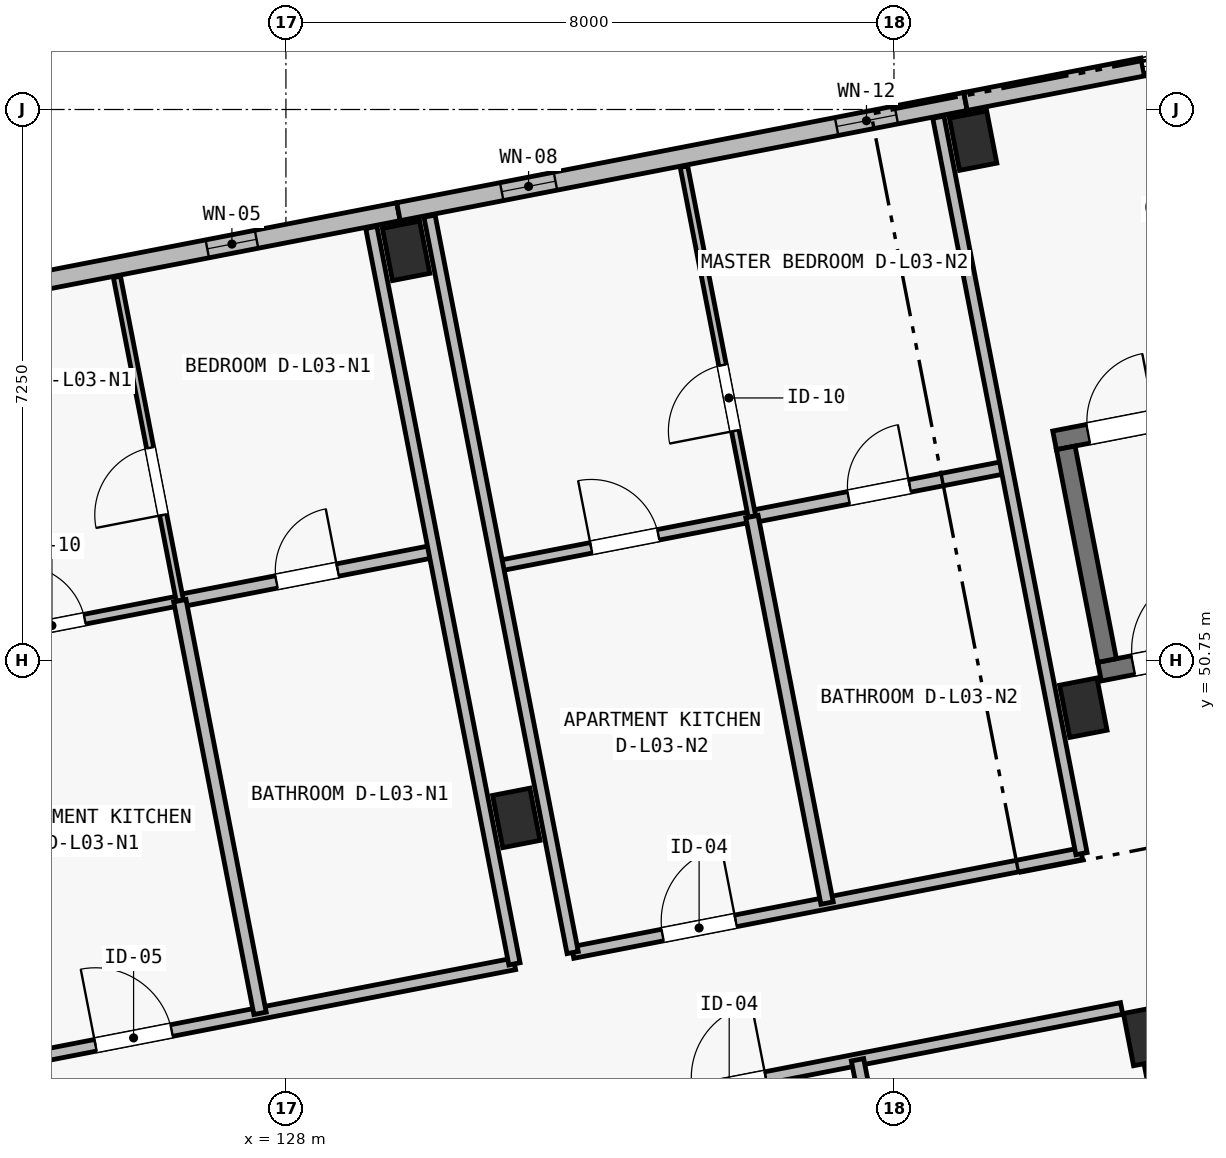
"""IFC4 building model, lengths in metres.
Left out: names, types, materials, properties, quantities, classifications, styles, units other than length and angle.
Written with IfcOpenShell. Run it as: python <this file> out.ifc"""

import sys

from ifc_helpers import new_model, si_unit, direction, frame, frame_2d, origin, origin_2d, place, context, subcontext, project, spatial, rectangle, extrude, element, fill, save


model = new_model("IFC4")
c1 = context("Model", 3, precision=1e-05, world=origin(), true_north=direction((0.0, 1.0)))
c2 = subcontext(c1, "Body", "Model", "MODEL_VIEW")
j1 = project(units=[si_unit("LENGTHUNIT", "METRE"), si_unit("PLANEANGLEUNIT", "RADIAN")], contexts=[c1])
p1 = place(None, origin())
s1 = spatial("IfcSite", under=j1, at=p1, CompositionType="ELEMENT")
p2 = place(p1, origin())
s2 = spatial("IfcBuilding", under=s1, at=p2, CompositionType="ELEMENT")
p3 = place(p2, frame((0.0, 0.0, 11.65)))
s3 = spatial("IfcBuildingStorey", under=s2, at=p3, CompositionType="ELEMENT", Elevation=11.65)
for number, where, z_axis, x_axis in (
    (1, (131.031, 48.68, 0.0), (0.0, 0.0, 1.0), (0.982, 0.191, 0.0)),
    (2, (129.581, 56.14, 0.0), (0.0, 0.0, 1.0), (0.982, 0.191, 0.0)),
    (3, (139.331, 45.811, 0.0), (0.0, 0.0, 1.0), (0.982, 0.191, 0.0)),
    (4, (138.491, 50.13, 0.0), (0.0, 0.0, 1.0), (0.982, 0.191, 0.0)),
    (5, (137.041, 57.59, 0.0), (0.0, 0.0, 1.0), (0.982, 0.191, 0.0)),
):
    element("IfcColumn", number, at=place(p3, frame(where, z_axis=z_axis, x_axis=x_axis)), inside=s3, PredefinedType="COLUMN", context=c2, shape_type="SweptSolid", body=[
        extrude(rectangle(XDim=0.5, YDim=0.7, at=origin_2d()), origin(), (0.0, 0.0, 1.0), 3.25),
    ])
p4 = place(p3, frame((140.714, 38.694, 0.0), z_axis=(0.0, 0.0, 1.0), x_axis=(-0.190819465253, 0.981625148252, 0.0)))
e6 = element("IfcWall", 6, at=p4, inside=s3, PredefinedType="SHEAR", context=c2, shape_type="SweptSolid", body=[
    extrude(rectangle(XDim=6.9, YDim=0.22, at=frame_2d((3.45, 0.0))), origin(), (0.0, 0.0, 1.0), 2.5),
])
p5 = place(p3, frame((138.113, 53.647, 0.0), z_axis=(0.0, 0.0, 1.0), x_axis=(0.981626097708, 0.19081458094, 0.0)))
e7 = element("IfcWall", 7, at=p5, inside=s3, PredefinedType="SHEAR", context=c2, shape_type="SweptSolid", body=[
    extrude(rectangle(XDim=7.0, YDim=0.25, at=frame_2d((3.5, 0.0))), origin(), (0.0, 0.0, 1.0), 3.25),
])
p6 = place(p5, frame((0.45, 0.0, 0.0)))
e8 = element("IfcOpeningElement", 8, at=p6, cuts=e7, PredefinedType="OPENING", context=c2, shape_type="SweptSolid", body=[
    extrude(rectangle(XDim=0.9, YDim=2.1, at=frame_2d((0.45, 1.05))), frame((0.0, 0.14, 0.0), z_axis=(0.0, -1.0, 0.0), x_axis=(1.0, 0.0, 0.0)), (0.0, 0.0, 1.0), 0.28),
])
p7 = place(p3, frame((138.705, 50.604, 0.0), z_axis=(0.0, 0.0, 1.0), x_axis=(0.981626097708, 0.19081458094, 0.0)))
e9 = element("IfcWall", 9, at=p7, inside=s3, PredefinedType="SHEAR", context=c2, shape_type="SweptSolid", body=[
    extrude(rectangle(XDim=7.0, YDim=0.25, at=frame_2d((3.5, 0.0))), origin(), (0.0, 0.0, 1.0), 3.25),
])
p8 = place(p7, frame((0.45, 0.0, 0.0)))
e10 = element("IfcOpeningElement", 10, at=p8, cuts=e9, PredefinedType="OPENING", context=c2, shape_type="SweptSolid", body=[
    extrude(rectangle(XDim=1.05, YDim=2.15, at=frame_2d((0.525, 1.075))), frame((0.0, 0.14, 0.0), z_axis=(0.0, -1.0, 0.0), x_axis=(1.0, 0.0, 0.0)), (0.0, 0.0, 1.0), 0.28),
])
p9 = place(p3, frame((138.804, 50.751, 0.0), z_axis=(0.0, 0.0, 1.0), x_axis=(-0.190858194834, 0.981617618762, 0.0)))
e11 = element("IfcWall", 11, at=p9, inside=s3, PredefinedType="SHEAR", context=c2, shape_type="SweptSolid", body=[
    extrude(rectangle(XDim=2.85, YDim=0.25, at=frame_2d((1.425, 0.0))), origin(), (0.0, 0.0, 1.0), 3.25),
])
p10 = place(p3, frame((122.02, 55.205, 0.0), z_axis=(0.0, 0.0, 1.0), x_axis=(0.981626422232, 0.190812911449, 0.0)))
e12 = element("IfcWall", 12, at=p10, inside=s3, PredefinedType="SOLIDWALL", context=c2, shape_type="SweptSolid", body=[
    extrude(rectangle(XDim=7.6, YDim=0.24, at=frame_2d((3.8, 0.0))), origin(), (0.0, 0.0, 1.0), 3.0),
])
p11 = place(p10, frame((1.932, 0.0, 0.44)))
e13 = element("IfcOpeningElement", 13, at=p11, cuts=e12, PredefinedType="OPENING", context=c2, shape_type="SweptSolid", body=[
    extrude(rectangle(XDim=0.58, YDim=2.16, at=frame_2d((0.29, 1.08))), frame((0.0, 0.135, 0.0), z_axis=(0.0, -1.0, 0.0), x_axis=(1.0, 0.0, 0.0)), (0.0, 0.0, 1.0), 0.27),
])
p12 = place(p10, frame((5.038, 0.0, 0.5)))
e14 = element("IfcOpeningElement", 14, at=p12, cuts=e12, PredefinedType="OPENING", context=c2, shape_type="SweptSolid", body=[
    extrude(rectangle(XDim=0.66, YDim=2.32, at=frame_2d((0.33, 1.16))), frame((0.0, 0.135, 0.0), z_axis=(0.0, -1.0, 0.0), x_axis=(1.0, 0.0, 0.0)), (0.0, 0.0, 1.0), 0.27),
])
p13 = place(p3, frame((129.481, 56.656, 0.0), z_axis=(0.0, 0.0, 1.0), x_axis=(0.981626422232, 0.190812911449, 0.0)))
e15 = element("IfcWall", 15, at=p13, inside=s3, PredefinedType="SOLIDWALL", context=c2, shape_type="SweptSolid", body=[
    extrude(rectangle(XDim=7.6, YDim=0.24, at=frame_2d((3.8, 0.0))), origin(), (0.0, 0.0, 1.0), 3.0),
])
p14 = place(p13, frame((1.384, 0.0, 0.5)))
e16 = element("IfcOpeningElement", 16, at=p14, cuts=e15, PredefinedType="OPENING", context=c2, shape_type="SweptSolid", body=[
    extrude(rectangle(XDim=0.72, YDim=2.16, at=frame_2d((0.36, 1.08))), frame((0.0, 0.135, 0.0), z_axis=(0.0, -1.0, 0.0), x_axis=(1.0, 0.0, 0.0)), (0.0, 0.0, 1.0), 0.27),
])
p15 = place(p13, frame((5.873, 0.0, 0.44)))
e17 = element("IfcOpeningElement", 17, at=p15, cuts=e15, PredefinedType="OPENING", context=c2, shape_type="SweptSolid", body=[
    extrude(rectangle(XDim=0.8, YDim=2.3, at=frame_2d((0.4, 1.15))), frame((0.0, 0.135, 0.0), z_axis=(0.0, -1.0, 0.0), x_axis=(1.0, 0.0, 0.0)), (0.0, 0.0, 1.0), 0.27),
])
p16 = place(p3, frame((136.941, 58.106, 0.0), z_axis=(0.0, 0.0, 1.0), x_axis=(0.981629832251, 0.190795367961, 0.0)))
e18 = element("IfcWall", 18, at=p16, inside=s3, PredefinedType="SOLIDWALL", context=c2, shape_type="SweptSolid", body=[
    extrude(rectangle(XDim=2.375, YDim=0.24, at=frame_2d((1.188, 0.0))), origin(), (0.0, 0.0, 1.0), 3.0),
])
p17 = place(p3, frame((132.046, 44.823, 0.0), z_axis=(0.0, 0.0, 1.0), x_axis=(0.9816234647, 0.190828125677, 0.0)))
e19 = element("IfcWall", 19, at=p17, inside=s3, PredefinedType="PARTITIONING", context=c2, shape_type="SweptSolid", body=[
    extrude(rectangle(XDim=7.08, YDim=0.155, at=frame_2d((3.54, 0.0))), origin(), (0.0, 0.0, 1.0), 2.97),
])
p18 = place(p17, frame((1.33, 0.0, 0.0)))
e20 = element("IfcOpeningElement", 20, at=p18, cuts=e19, PredefinedType="OPENING", context=c2, shape_type="SweptSolid", body=[
    extrude(rectangle(XDim=0.98, YDim=2.15, at=frame_2d((0.49, 1.075))), frame((0.0, 0.093, 0.0), z_axis=(0.0, -1.0, 0.0), x_axis=(1.0, 0.0, 0.0)), (0.0, 0.0, 1.0), 0.185),
])
p19 = place(p3, frame((136.297, 41.503, 0.0), z_axis=(0.0, 0.0, 1.0), x_axis=(-0.190807044121, 0.981627562731, 0.0)))
e21 = element("IfcWall", 21, at=p19, inside=s3, PredefinedType="PLUMBINGWALL", context=c2, shape_type="SweptSolid", body=[
    extrude(rectangle(XDim=4.07, YDim=0.165, at=frame_2d((2.035, 0.0))), origin(), (0.0, 0.0, 1.0), 2.97),
])
p20 = place(p3, frame((124.312, 45.459, 0.0), z_axis=(0.0, 0.0, 1.0), x_axis=(0.981627870431, 0.190805461121, 0.0)))
e22 = element("IfcWall", 22, at=p20, inside=s3, PredefinedType="PARTITIONING", context=c2, shape_type="SweptSolid", body=[
    extrude(rectangle(XDim=6.82, YDim=0.155, at=frame_2d((3.41, 0.0))), origin(), (0.0, 0.0, 1.0), 2.97),
])
p21 = place(p20, frame((1.205, 0.0, 0.0)))
e23 = element("IfcOpeningElement", 23, at=p21, cuts=e22, PredefinedType="OPENING", context=c2, shape_type="SweptSolid", body=[
    extrude(rectangle(XDim=1.02, YDim=2.2, at=frame_2d((0.51, 1.1))), frame((0.0, 0.093, 0.0), z_axis=(0.0, -1.0, 0.0), x_axis=(1.0, 0.0, 0.0)), (0.0, 0.0, 1.0), 0.185),
])
p22 = place(p3, frame((123.257, 50.887, 0.0), z_axis=(0.0, 0.0, 1.0), x_axis=(0.981629173664, 0.190798756314, 0.0)))
e24 = element("IfcWall", 24, at=p22, inside=s3, PredefinedType="PARTITIONING", context=c2, shape_type="SweptSolid", body=[
    extrude(rectangle(XDim=3.41, YDim=0.13, at=frame_2d((1.705, 0.0))), origin(), (0.0, 0.0, 1.0), 2.97),
])
p23 = place(p22, frame((1.255, 0.0, 0.0)))
e25 = element("IfcOpeningElement", 25, at=p23, cuts=e24, PredefinedType="OPENING", context=c2, shape_type="SweptSolid", body=[
    extrude(rectangle(XDim=0.88, YDim=2.1, at=frame_2d((0.44, 1.05))), frame((0.0, 0.08, 0.0), z_axis=(0.0, -1.0, 0.0), x_axis=(1.0, 0.0, 0.0)), (0.0, 0.0, 1.0), 0.16),
])
p24 = place(p3, frame((126.604, 51.538, 0.0), z_axis=(0.0, 0.0, 1.0), x_axis=(0.98162656706, 0.190812166391, 0.0)))
e26 = element("IfcWall", 26, at=p24, inside=s3, PredefinedType="PLUMBINGWALL", context=c2, shape_type="SweptSolid", body=[
    extrude(rectangle(XDim=3.41, YDim=0.165, at=frame_2d((1.705, 0.0))), origin(), (0.0, 0.0, 1.0), 2.97),
])
p25 = place(p24, frame((1.295, 0.0, 0.0)))
e27 = element("IfcOpeningElement", 27, at=p25, cuts=e26, PredefinedType="OPENING", context=c2, shape_type="SweptSolid", body=[
    extrude(rectangle(XDim=0.82, YDim=2.08, at=frame_2d((0.41, 1.04))), frame((0.0, 0.097, 0.0), z_axis=(0.0, -1.0, 0.0), x_axis=(1.0, 0.0, 0.0)), (0.0, 0.0, 1.0), 0.195),
])
p26 = place(p3, frame((126.604, 51.538, 0.0), z_axis=(0.0, 0.0, 1.0), x_axis=(-0.190812443151, 0.981626513262, 0.0)))
e28 = element("IfcWall", 28, at=p26, inside=s3, PredefinedType="PARTITIONING", context=c2, shape_type="SweptSolid", body=[
    extrude(rectangle(XDim=4.34, YDim=0.095, at=frame_2d((2.17, 0.0))), origin(), (0.0, 0.0, 1.0), 2.97),
])
p27 = place(p26, frame((1.15, 0.0, 0.0)))
e29 = element("IfcOpeningElement", 29, at=p27, cuts=e28, PredefinedType="OPENING", context=c2, shape_type="SweptSolid", body=[
    extrude(rectangle(XDim=0.9, YDim=2.1, at=frame_2d((0.45, 1.05))), frame((0.0, 0.062, 0.0), z_axis=(0.0, -1.0, 0.0), x_axis=(1.0, 0.0, 0.0)), (0.0, 0.0, 1.0), 0.125),
])
p28 = place(p3, frame((127.66, 46.109, 0.0), z_axis=(0.0, 0.0, 1.0), x_axis=(-0.190815300433, 0.981625957848, 0.0)))
e30 = element("IfcWall", 30, at=p28, inside=s3, PredefinedType="PLUMBINGWALL", context=c2, shape_type="SweptSolid", body=[
    extrude(rectangle(XDim=5.53, YDim=0.165, at=frame_2d((2.765, 0.0))), origin(), (0.0, 0.0, 1.0), 2.97),
])
p29 = place(p3, frame((131.007, 46.76, 0.0), z_axis=(0.0, 0.0, 1.0), x_axis=(-0.190809410863, 0.981627102685, 0.0)))
e31 = element("IfcWall", 31, at=p29, inside=s3, PredefinedType="PARTITIONING", context=c2, shape_type="SweptSolid", body=[
    extrude(rectangle(XDim=9.87, YDim=0.15, at=frame_2d((4.935, 0.0))), origin(), (0.0, 0.0, 1.0), 2.97),
])
p30 = place(p3, frame((131.772, 46.909, 0.0), z_axis=(0.0, 0.0, 1.0), x_axis=(0.981622468528, 0.190833249935, 0.0)))
e32 = element("IfcWall", 32, at=p30, inside=s3, PredefinedType="PARTITIONING", context=c2, shape_type="SweptSolid", body=[
    extrude(rectangle(XDim=6.82, YDim=0.155, at=frame_2d((3.41, 0.0))), origin(), (0.0, 0.0, 1.0), 2.97),
])
p31 = place(p30, frame((1.205, 0.0, 0.0)))
e33 = element("IfcOpeningElement", 33, at=p31, cuts=e32, PredefinedType="OPENING", context=c2, shape_type="SweptSolid", body=[
    extrude(rectangle(XDim=0.98, YDim=2.15, at=frame_2d((0.49, 1.075))), frame((0.0, 0.093, 0.0), z_axis=(0.0, -1.0, 0.0), x_axis=(1.0, 0.0, 0.0)), (0.0, 0.0, 1.0), 0.185),
])
p32 = place(p3, frame((130.784, 51.994, 0.0), z_axis=(0.0, 0.0, 1.0), x_axis=(0.981629173664, 0.190798756314, 0.0)))
e34 = element("IfcWall", 34, at=p32, inside=s3, PredefinedType="PARTITIONING", context=c2, shape_type="SweptSolid", body=[
    extrude(rectangle(XDim=3.41, YDim=0.14, at=frame_2d((1.705, 0.0))), origin(), (0.0, 0.0, 1.0), 2.97),
])
p33 = place(p32, frame((1.255, 0.0, 0.0)))
e35 = element("IfcOpeningElement", 35, at=p33, cuts=e34, PredefinedType="OPENING", context=c2, shape_type="SweptSolid", body=[
    extrude(rectangle(XDim=0.9, YDim=2.1, at=frame_2d((0.45, 1.05))), frame((0.0, 0.085, 0.0), z_axis=(0.0, -1.0, 0.0), x_axis=(1.0, 0.0, 0.0)), (0.0, 0.0, 1.0), 0.17),
])
p34 = place(p3, frame((134.132, 52.644, 0.0), z_axis=(0.0, 0.0, 1.0), x_axis=(0.981629173664, 0.190798756314, 0.0)))
e36 = element("IfcWall", 36, at=p34, inside=s3, PredefinedType="PLUMBINGWALL", context=c2, shape_type="SweptSolid", body=[
    extrude(rectangle(XDim=3.41, YDim=0.165, at=frame_2d((1.705, 0.0))), origin(), (0.0, 0.0, 1.0), 2.97),
])
p35 = place(p34, frame((1.295, 0.0, 0.0)))
e37 = element("IfcOpeningElement", 37, at=p35, cuts=e36, PredefinedType="OPENING", context=c2, shape_type="SweptSolid", body=[
    extrude(rectangle(XDim=0.82, YDim=2.08, at=frame_2d((0.41, 1.04))), frame((0.0, 0.097, 0.0), z_axis=(0.0, -1.0, 0.0), x_axis=(1.0, 0.0, 0.0)), (0.0, 0.0, 1.0), 0.195),
])
p36 = place(p3, frame((134.132, 52.644, 0.0), z_axis=(0.0, 0.0, 1.0), x_axis=(-0.190837612577, 0.981621620394, 0.0)))
e38 = element("IfcWall", 38, at=p36, inside=s3, PredefinedType="PARTITIONING", context=c2, shape_type="SweptSolid", body=[
    extrude(rectangle(XDim=4.69, YDim=0.1, at=frame_2d((2.345, 0.0))), origin(), (0.0, 0.0, 1.0), 2.97),
])
p37 = place(p36, frame((1.15, 0.0, 0.0)))
e39 = element("IfcOpeningElement", 39, at=p37, cuts=e38, PredefinedType="OPENING", context=c2, shape_type="SweptSolid", body=[
    extrude(rectangle(XDim=0.88, YDim=2.1, at=frame_2d((0.44, 1.05))), frame((0.0, 0.065, 0.0), z_axis=(0.0, -1.0, 0.0), x_axis=(1.0, 0.0, 0.0)), (0.0, 0.0, 1.0), 0.13),
])
p38 = place(p3, frame((135.12, 47.559, 0.0), z_axis=(0.0, 0.0, 1.0), x_axis=(-0.190783877533, 0.981632065528, 0.0)))
e40 = element("IfcWall", 40, at=p38, inside=s3, PredefinedType="PLUMBINGWALL", context=c2, shape_type="SweptSolid", body=[
    extrude(rectangle(XDim=5.18, YDim=0.165, at=frame_2d((2.59, 0.0))), origin(), (0.0, 0.0, 1.0), 2.97),
])
p39 = place(p3, frame((131.772, 46.909, 0.0), z_axis=(0.0, 0.0, 1.0), x_axis=(-0.1907855758, 0.981631735462, 0.0)))
e41 = element("IfcWall", 41, at=p39, inside=s3, PredefinedType="PARTITIONING", context=c2, shape_type="SweptSolid", body=[
    extrude(rectangle(XDim=9.87, YDim=0.15, at=frame_2d((4.935, 0.0))), origin(), (0.0, 0.0, 1.0), 2.97),
])
p40 = place(p3, frame((138.467, 48.21, 0.0), z_axis=(0.0, 0.0, 1.0), x_axis=(-0.190814044018, 0.981626202078, 0.0)))
e42 = element("IfcWall", 42, at=p40, inside=s3, PredefinedType="PARTITIONING", context=c2, shape_type="SweptSolid", body=[
    extrude(rectangle(XDim=9.87, YDim=0.15, at=frame_2d((4.935, 0.0))), origin(), (0.0, 0.0, 1.0), 2.97),
])
p41 = place(p12, origin())
e43 = element("IfcWindow", 43, at=p41, inside=s3, PartitioningType="SINGLE_PANEL", PredefinedType="WINDOW", context=c2, shape_type="SweptSolid", body=[
    extrude(rectangle(XDim=0.66, YDim=2.32, at=frame_2d((0.33, 1.16))), frame((0.0, 0.03, 0.0), z_axis=(0.0, -1.0, 0.0), x_axis=(1.0, 0.0, 0.0)), (0.0, 0.0, 1.0), 0.06),
])
fill(e14, e43)
p42 = place(p14, origin())
e44 = element("IfcWindow", 44, at=p42, inside=s3, PartitioningType="SINGLE_PANEL", PredefinedType="WINDOW", context=c2, shape_type="SweptSolid", body=[
    extrude(rectangle(XDim=0.72, YDim=2.16, at=frame_2d((0.36, 1.08))), frame((0.0, 0.03, 0.0), z_axis=(0.0, -1.0, 0.0), x_axis=(1.0, 0.0, 0.0)), (0.0, 0.0, 1.0), 0.06),
])
fill(e16, e44)
p43 = place(p15, origin())
e45 = element("IfcWindow", 45, at=p43, inside=s3, PartitioningType="SINGLE_PANEL", PredefinedType="WINDOW", context=c2, shape_type="SweptSolid", body=[
    extrude(rectangle(XDim=0.8, YDim=2.3, at=frame_2d((0.4, 1.15))), frame((0.0, 0.03, 0.0), z_axis=(0.0, -1.0, 0.0), x_axis=(1.0, 0.0, 0.0)), (0.0, 0.0, 1.0), 0.06),
])
fill(e17, e45)
p44 = place(p18, origin())
e46 = element("IfcDoor", 46, at=p44, inside=s3, OperationType="SINGLE_SWING_RIGHT", PredefinedType="DOOR", context=c2, shape_type="SweptSolid", body=[
    extrude(rectangle(XDim=0.98, YDim=2.15, at=frame_2d((0.49, 1.075))), frame((0.0, 0.025, 0.0), z_axis=(0.0, -1.0, 0.0), x_axis=(1.0, 0.0, 0.0)), (0.0, 0.0, 1.0), 0.05),
])
fill(e20, e46)
p45 = place(p21, origin())
e47 = element("IfcDoor", 47, at=p45, inside=s3, OperationType="SINGLE_SWING_LEFT", PredefinedType="DOOR", context=c2, shape_type="SweptSolid", body=[
    extrude(rectangle(XDim=1.02, YDim=2.2, at=frame_2d((0.51, 1.1))), frame((0.0, 0.025, 0.0), z_axis=(0.0, -1.0, 0.0), x_axis=(1.0, 0.0, 0.0)), (0.0, 0.0, 1.0), 0.05),
])
fill(e23, e47)
p46 = place(p23, origin())
e48 = element("IfcDoor", 48, at=p46, inside=s3, OperationType="SINGLE_SWING_LEFT", PredefinedType="DOOR", context=c2, shape_type="SweptSolid", body=[
    extrude(rectangle(XDim=0.88, YDim=2.1, at=frame_2d((0.44, 1.05))), frame((0.0, 0.025, 0.0), z_axis=(0.0, -1.0, 0.0), x_axis=(1.0, 0.0, 0.0)), (0.0, 0.0, 1.0), 0.05),
])
fill(e25, e48)
p47 = place(p25, origin())
e49 = element("IfcDoor", 49, at=p47, inside=s3, OperationType="SINGLE_SWING_RIGHT", PredefinedType="DOOR", context=c2, shape_type="SweptSolid", body=[
    extrude(rectangle(XDim=0.82, YDim=2.08, at=frame_2d((0.41, 1.04))), frame((0.0, 0.025, 0.0), z_axis=(0.0, -1.0, 0.0), x_axis=(1.0, 0.0, 0.0)), (0.0, 0.0, 1.0), 0.05),
])
fill(e27, e49)
p48 = place(p27, origin())
e50 = element("IfcDoor", 50, at=p48, inside=s3, OperationType="SINGLE_SWING_LEFT", PredefinedType="DOOR", context=c2, shape_type="SweptSolid", body=[
    extrude(rectangle(XDim=0.9, YDim=2.1, at=frame_2d((0.45, 1.05))), frame((0.0, 0.025, 0.0), z_axis=(0.0, -1.0, 0.0), x_axis=(1.0, 0.0, 0.0)), (0.0, 0.0, 1.0), 0.05),
])
fill(e29, e50)
p49 = place(p31, origin())
e51 = element("IfcDoor", 51, at=p49, inside=s3, OperationType="SINGLE_SWING_RIGHT", PredefinedType="DOOR", context=c2, shape_type="SweptSolid", body=[
    extrude(rectangle(XDim=0.98, YDim=2.15, at=frame_2d((0.49, 1.075))), frame((0.0, 0.025, 0.0), z_axis=(0.0, -1.0, 0.0), x_axis=(1.0, 0.0, 0.0)), (0.0, 0.0, 1.0), 0.05),
])
fill(e33, e51)
p50 = place(p33, origin())
e52 = element("IfcDoor", 52, at=p50, inside=s3, OperationType="SINGLE_SWING_LEFT", PredefinedType="DOOR", context=c2, shape_type="SweptSolid", body=[
    extrude(rectangle(XDim=0.9, YDim=2.1, at=frame_2d((0.45, 1.05))), frame((0.0, 0.025, 0.0), z_axis=(0.0, -1.0, 0.0), x_axis=(1.0, 0.0, 0.0)), (0.0, 0.0, 1.0), 0.05),
])
fill(e35, e52)
p51 = place(p35, origin())
e53 = element("IfcDoor", 53, at=p51, inside=s3, OperationType="SINGLE_SWING_RIGHT", PredefinedType="DOOR", context=c2, shape_type="SweptSolid", body=[
    extrude(rectangle(XDim=0.82, YDim=2.08, at=frame_2d((0.41, 1.04))), frame((0.0, 0.025, 0.0), z_axis=(0.0, -1.0, 0.0), x_axis=(1.0, 0.0, 0.0)), (0.0, 0.0, 1.0), 0.05),
])
fill(e37, e53)
p52 = place(p37, origin())
e54 = element("IfcDoor", 54, at=p52, inside=s3, OperationType="SINGLE_SWING_LEFT", PredefinedType="DOOR", context=c2, shape_type="SweptSolid", body=[
    extrude(rectangle(XDim=0.88, YDim=2.1, at=frame_2d((0.44, 1.05))), frame((0.0, 0.025, 0.0), z_axis=(0.0, -1.0, 0.0), x_axis=(1.0, 0.0, 0.0)), (0.0, 0.0, 1.0), 0.05),
])
fill(e39, e54)
p53 = place(p8, origin())
e55 = element("IfcDoor", 55, at=p53, inside=s3, OperationType="SINGLE_SWING_RIGHT", PredefinedType="DOOR", context=c2, shape_type="SweptSolid", body=[
    extrude(rectangle(XDim=1.05, YDim=2.15, at=frame_2d((0.525, 1.075))), frame((0.0, 0.025, 0.0), z_axis=(0.0, -1.0, 0.0), x_axis=(1.0, 0.0, 0.0)), (0.0, 0.0, 1.0), 0.05),
])
fill(e10, e55)
p54 = place(p6, origin())
e56 = element("IfcDoor", 56, at=p54, inside=s3, OperationType="SINGLE_SWING_RIGHT", PredefinedType="DOOR", context=c2, shape_type="SweptSolid", body=[
    extrude(rectangle(XDim=0.9, YDim=2.1, at=frame_2d((0.45, 1.05))), frame((0.0, 0.025, 0.0), z_axis=(0.0, -1.0, 0.0), x_axis=(1.0, 0.0, 0.0)), (0.0, 0.0, 1.0), 0.05),
])
fill(e8, e56)
save(model, sys.argv[1])
